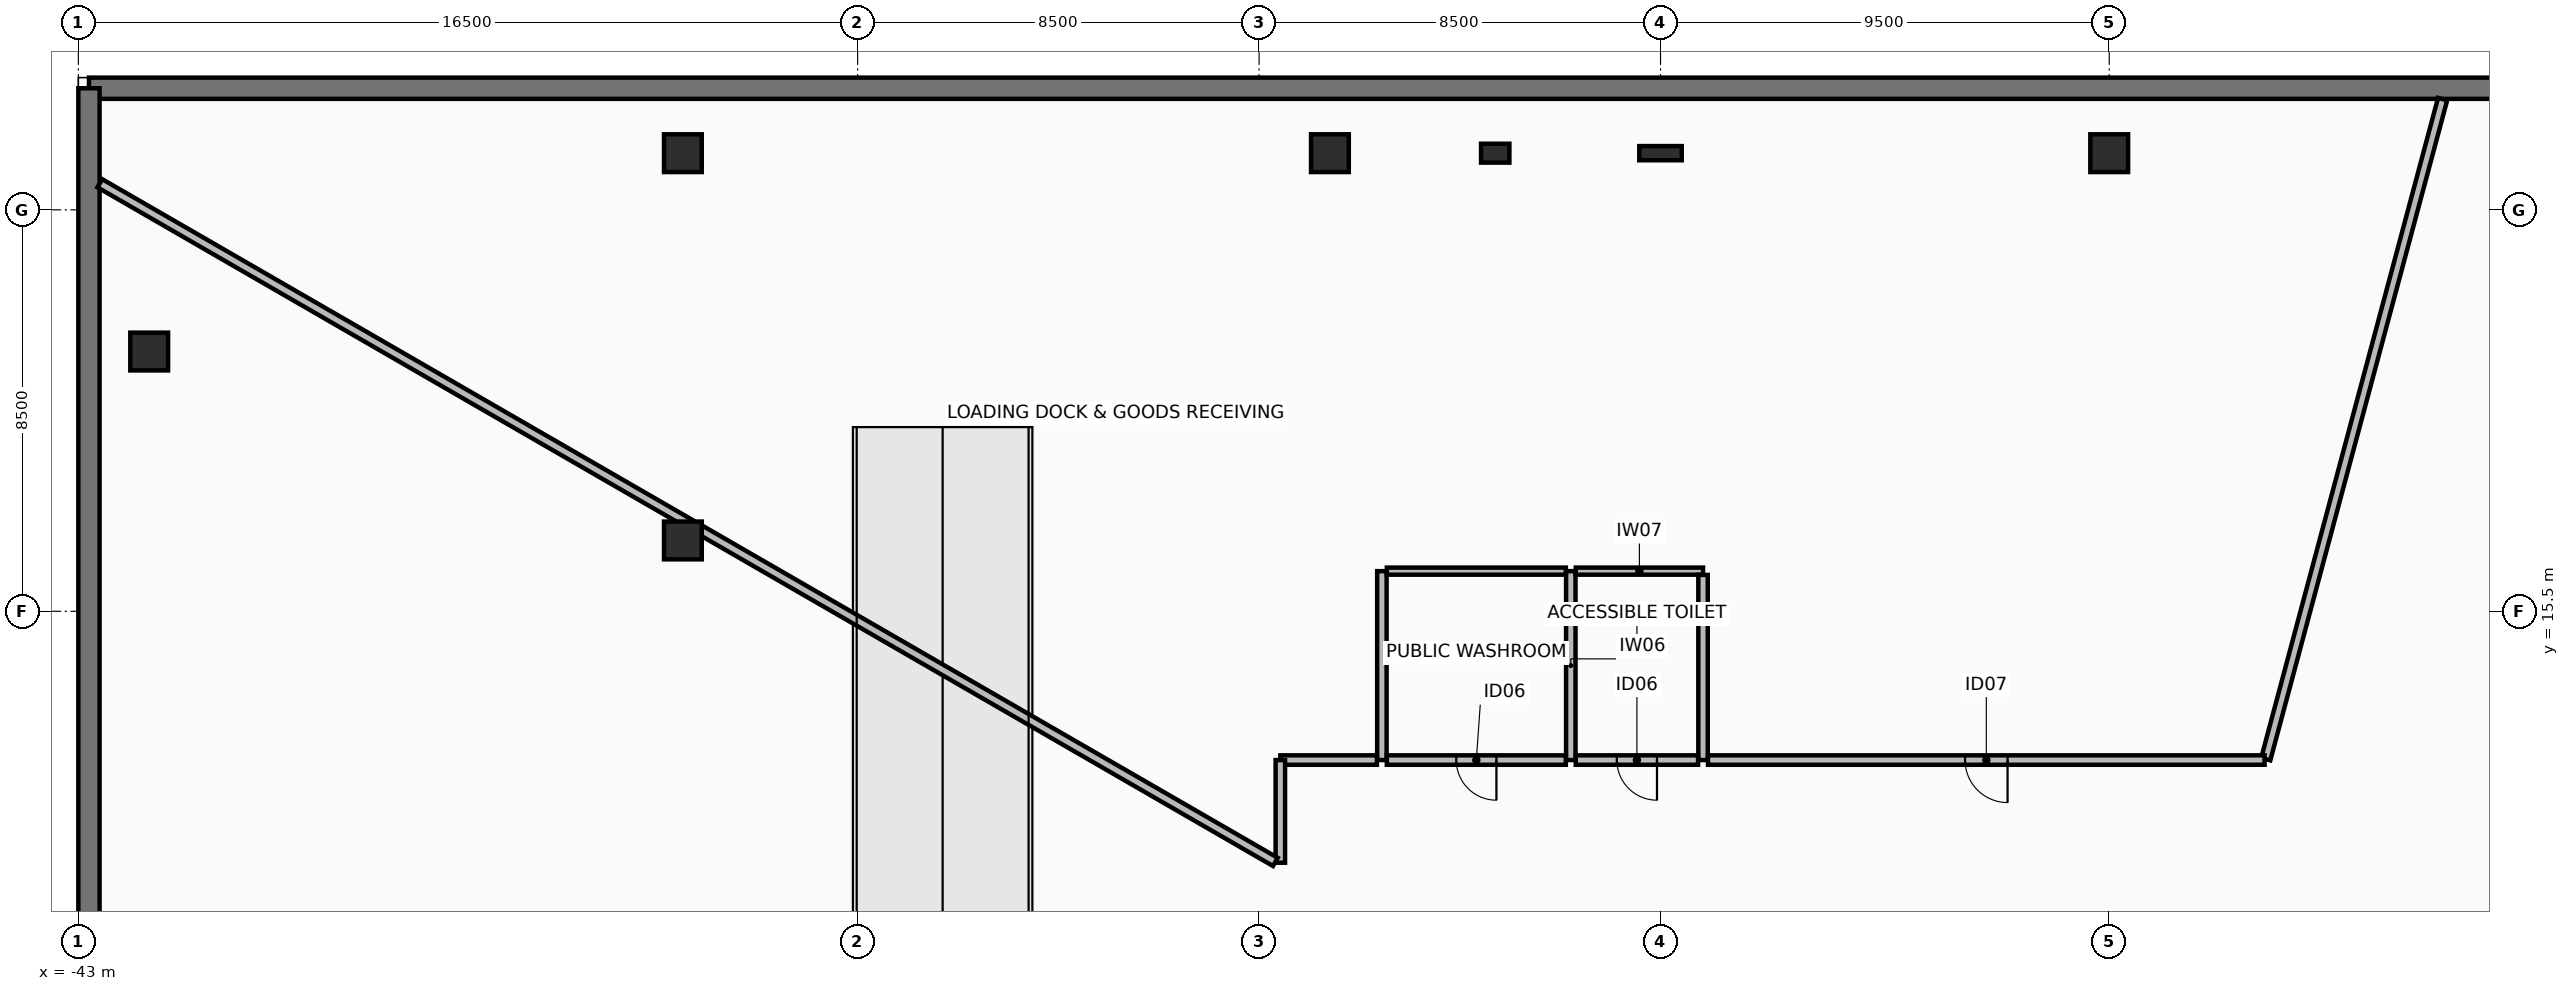
"""IFC4 building model, lengths in metres.
Left out: names, types, materials, properties, quantities, classifications, styles, units other than length and angle.
Written with IfcOpenShell. Run it as: python <this file> out.ifc"""

import sys

from ifc_helpers import new_model, si_unit, direction, frame, frame_2d, origin, origin_2d, place, context, subcontext, project, spatial, rectangle, hollow_rectangle, i_section, extrude, element, fill, save


model = new_model("IFC4")
c1 = context("Model", 3, precision=1e-05, world=origin(), true_north=direction((0.0, 1.0)))
c2 = subcontext(c1, "Body", "Model", "MODEL_VIEW")
j1 = project(units=[si_unit("LENGTHUNIT", "METRE"), si_unit("PLANEANGLEUNIT", "RADIAN")], contexts=[c1])
p1 = place(None, origin())
s1 = spatial("IfcSite", under=j1, at=p1, CompositionType="ELEMENT")
p2 = place(p1, origin())
s2 = spatial("IfcBuilding", under=s1, at=p2, CompositionType="ELEMENT")
p3 = place(p2, frame((0.0, 0.0, -4.5)))
s3 = spatial("IfcBuildingStorey", under=s2, at=p3, CompositionType="ELEMENT", Elevation=-4.5)
p4 = place(p3, frame((-13.0, 25.2, 0.0), z_axis=(0.0, 0.0, 1.0), x_axis=(1.0, 0.0, 0.0)))
e1 = element("IfcColumn", 1, at=p4, inside=s3, PredefinedType="PILASTER", context=c2, shape_type="SweptSolid", body=[
    extrude(rectangle(XDim=0.6, YDim=0.4, at=origin_2d()), origin(), (0.0, 0.0, 1.0), 4.5),
])
for number, where, z_axis, x_axis in (
    (2, (-30.2, 25.2, 0.0), (0.0, 0.0, 1.0), (1.0, 0.0, 0.0)),
    (3, (-16.5, 25.2, 0.0), (0.0, 0.0, 1.0), (1.0, 0.0, 0.0)),
):
    element("IfcColumn", number, at=place(p3, frame(where, z_axis=z_axis, x_axis=x_axis)), inside=s3, PredefinedType="COLUMN", context=c2, shape_type="SweptSolid", body=[
        extrude(hollow_rectangle(XDim=0.8, YDim=0.8, WallThickness=0.045, at=origin_2d()), origin(), (0.0, 0.0, 1.0), 4.5),
    ])
p5 = place(p3, frame((-9.5, 25.2, 0.0), z_axis=(0.0, 0.0, 1.0), x_axis=(1.0, 0.0, 0.0)))
e4 = element("IfcColumn", 4, at=p5, inside=s3, PredefinedType="COLUMN", context=c2, shape_type="SweptSolid", body=[
    extrude(i_section(OverallWidth=0.3, OverallDepth=0.9, WebThickness=0.019, FlangeThickness=0.035, at=origin_2d()), origin(), (0.0, 0.0, 1.0), 4.5),
])
for number, where, z_axis, x_axis in (
    (5, (0.0, 25.2, 0.0), (0.0, 0.0, 1.0), (1.0, 0.0, 0.0)),
    (6, (-30.2, 17.0, 0.0), (0.0, 0.0, 1.0), (1.0, 0.0, 0.0)),
    (7, (-41.5, 21.0, 0.0), (0.0, 0.0, 1.0), (1.0, 0.0, 0.0)),
):
    element("IfcColumn", number, at=place(p3, frame(where, z_axis=z_axis, x_axis=x_axis)), inside=s3, PredefinedType="COLUMN", context=c2, shape_type="SweptSolid", body=[
        extrude(hollow_rectangle(XDim=0.8, YDim=0.8, WallThickness=0.045, at=origin_2d()), origin(), (0.0, 0.0, 1.0), 4.5),
    ])
p6 = place(p3, frame((42.775, 26.575, 0.0), z_axis=(0.0, 0.0, 1.0), x_axis=(-1.0, 0.0, 0.0)))
e8 = element("IfcWall", 8, at=p6, inside=s3, PredefinedType="STANDARD", context=c2, shape_type="SweptSolid", body=[
    extrude(rectangle(XDim=85.55, YDim=0.45, at=frame_2d((42.775, 0.0))), origin(), (0.0, 0.0, 1.0), 4.2),
])
p7 = place(p3, frame((-42.775, 26.575, 0.0), z_axis=(0.0, 0.0, 1.0), x_axis=(0.0, -1.0, 0.0)))
e9 = element("IfcWall", 9, at=p7, inside=s3, PredefinedType="STANDARD", context=c2, shape_type="SweptSolid", body=[
    extrude(rectangle(XDim=54.35, YDim=0.45, at=frame_2d((27.175, 0.0))), origin(), (0.0, 0.0, 1.0), 4.2),
])
p8 = place(p3, frame((-11.4, 12.35, 0.0), z_axis=(0.0, 0.0, 1.0), x_axis=(0.0, 1.0, 0.0)))
e10 = element("IfcWall", 10, at=p8, inside=s3, PredefinedType="PARTITIONING", context=c2, shape_type="SweptSolid", body=[
    extrude(rectangle(XDim=4.0, YDim=0.2, at=frame_2d((2.0, 0.0))), origin(), (0.0, 0.0, 1.0), 3.745),
])
p9 = place(p3, frame((-11.295, 16.35, 0.0), z_axis=(0.0, 0.0, 1.0), x_axis=(1.0, 0.0, 0.0)))
e11 = element("IfcWall", 11, at=p9, inside=s3, PredefinedType="PARTITIONING", context=c2, shape_type="SweptSolid", body=[
    extrude(rectangle(XDim=2.695, YDim=0.15, at=frame_2d((1.347, 0.0))), origin(), (0.0, 0.0, 1.0), 3.545),
])
p10 = place(p3, frame((-8.6, 16.27, 0.0), z_axis=(0.0, 0.0, 1.0), x_axis=(0.0, -1.0, 0.0)))
e12 = element("IfcWall", 12, at=p10, inside=s3, PredefinedType="PARTITIONING", context=c2, shape_type="SweptSolid", body=[
    extrude(rectangle(XDim=3.92, YDim=0.2, at=frame_2d((1.96, 0.0))), origin(), (0.0, 0.0, 1.0), 3.745),
])
p11 = place(p3, frame((-8.705, 12.35, 0.0), z_axis=(0.0, 0.0, 1.0), x_axis=(-1.0, 0.0, 0.0)))
e13 = element("IfcWall", 13, at=p11, inside=s3, PredefinedType="PARTITIONING", context=c2, shape_type="SweptSolid", body=[
    extrude(rectangle(XDim=2.59, YDim=0.2, at=frame_2d((1.295, 0.0))), origin(), (0.0, 0.0, 1.0), 3.545),
])
p12 = place(p11, frame((0.87, 0.0, 0.0)))
e14 = element("IfcOpeningElement", 14, at=p12, cuts=e13, PredefinedType="OPENING", context=c2, shape_type="SweptSolid", body=[
    extrude(rectangle(XDim=0.85, YDim=2.1, at=frame_2d((0.425, 1.05))), frame((0.0, 0.11, 0.0), z_axis=(0.0, -1.0, 0.0), x_axis=(1.0, 0.0, 0.0)), (0.0, 0.0, 1.0), 0.22),
])
p13 = place(p3, frame((-15.4, 12.35, 0.0), z_axis=(0.0, 0.0, 1.0), x_axis=(0.0, 1.0, 0.0)))
e15 = element("IfcWall", 15, at=p13, inside=s3, PredefinedType="PARTITIONING", context=c2, shape_type="SweptSolid", body=[
    extrude(rectangle(XDim=4.0, YDim=0.2, at=frame_2d((2.0, 0.0))), origin(), (0.0, 0.0, 1.0), 3.745),
])
p14 = place(p3, frame((-15.295, 16.35, 0.0), z_axis=(0.0, 0.0, 1.0), x_axis=(1.0, 0.0, 0.0)))
e16 = element("IfcWall", 16, at=p14, inside=s3, PredefinedType="PARTITIONING", context=c2, shape_type="SweptSolid", body=[
    extrude(rectangle(XDim=3.79, YDim=0.15, at=frame_2d((1.895, 0.0))), origin(), (0.0, 0.0, 1.0), 4.2),
])
p15 = place(p3, frame((-11.505, 12.35, 0.0), z_axis=(0.0, 0.0, 1.0), x_axis=(-1.0, 0.0, 0.0)))
e17 = element("IfcWall", 17, at=p15, inside=s3, PredefinedType="PARTITIONING", context=c2, shape_type="SweptSolid", body=[
    extrude(rectangle(XDim=3.79, YDim=0.2, at=frame_2d((1.895, 0.0))), origin(), (0.0, 0.0, 1.0), 4.2),
])
p16 = place(p15, frame((1.47, 0.0, 0.0)))
e18 = element("IfcOpeningElement", 18, at=p16, cuts=e17, PredefinedType="OPENING", context=c2, shape_type="SweptSolid", body=[
    extrude(rectangle(XDim=0.85, YDim=2.1, at=frame_2d((0.425, 1.05))), frame((0.0, 0.11, 0.0), z_axis=(0.0, -1.0, 0.0), x_axis=(1.0, 0.0, 0.0)), (0.0, 0.0, 1.0), 0.22),
])
p17 = place(p3, frame((7.059, 26.345, 0.0), z_axis=(0.0, 0.0, 1.0), x_axis=(-0.258810302239, -0.96592816889, 0.0)))
e19 = element("IfcWall", 19, at=p17, inside=s3, PredefinedType="PARTITIONING", context=c2, shape_type="SweptSolid", body=[
    extrude(rectangle(XDim=14.469, YDim=0.2, at=frame_2d((7.235, 0.0))), origin(), (0.0, 0.0, 1.0), 3.295),
])
p18 = place(p3, frame((3.29, 12.35, 0.0), z_axis=(0.0, 0.0, 1.0), x_axis=(-1.0, 0.0, 0.0)))
e20 = element("IfcWall", 20, at=p18, inside=s3, PredefinedType="PARTITIONING", context=c2, shape_type="SweptSolid", body=[
    extrude(rectangle(XDim=11.785, YDim=0.2, at=frame_2d((5.893, 0.0))), origin(), (0.0, 0.0, 1.0), 3.545),
])
p19 = place(p18, frame((5.442, 0.0, 0.0)))
e21 = element("IfcOpeningElement", 21, at=p19, cuts=e20, PredefinedType="OPENING", context=c2, shape_type="SweptSolid", body=[
    extrude(rectangle(XDim=0.9, YDim=2.1, at=frame_2d((0.45, 1.05))), frame((0.0, 0.11, 0.0), z_axis=(0.0, -1.0, 0.0), x_axis=(1.0, 0.0, 0.0)), (0.0, 0.0, 1.0), 0.22),
])
p20 = place(p3, frame((-15.505, 12.35, 0.0), z_axis=(0.0, 0.0, 1.0), x_axis=(-1.0, 0.0, 0.0)))
e22 = element("IfcWall", 22, at=p20, inside=s3, PredefinedType="PARTITIONING", context=c2, shape_type="SweptSolid", body=[
    extrude(rectangle(XDim=2.044, YDim=0.2, at=frame_2d((1.022, 0.0))), origin(), (0.0, 0.0, 1.0), 3.545),
])
p21 = place(p3, frame((-17.55, 12.349, 0.0), z_axis=(0.0, 0.0, 1.0), x_axis=(0.0, -1.0, 0.0)))
e23 = element("IfcWall", 23, at=p21, inside=s3, PredefinedType="PARTITIONING", context=c2, shape_type="SweptSolid", body=[
    extrude(rectangle(XDim=2.174, YDim=0.2, at=frame_2d((1.087, 0.0))), origin(), (0.0, 0.0, 1.0), 4.2),
])
p22 = place(p3, frame((-17.655, 10.193, 0.0), z_axis=(0.0, 0.0, 1.0), x_axis=(-0.866026443251, 0.499998199587, 0.0)))
e24 = element("IfcWall", 24, at=p22, inside=s3, PredefinedType="PARTITIONING", context=c2, shape_type="SweptSolid", body=[
    extrude(rectangle(XDim=28.74, YDim=0.2, at=frame_2d((14.37, 0.0))), origin(), (0.0, 0.0, 1.0), 3.395),
])
p23 = place(p12, origin())
e25 = element("IfcDoor", 25, at=p23, inside=s3, OperationType="SINGLE_SWING_RIGHT", PredefinedType="DOOR", context=c2, shape_type="SweptSolid", body=[
    extrude(rectangle(XDim=0.85, YDim=2.1, at=frame_2d((0.425, 1.05))), frame((0.0, 0.025, 0.0), z_axis=(0.0, -1.0, 0.0), x_axis=(1.0, 0.0, 0.0)), (0.0, 0.0, 1.0), 0.05),
])
fill(e14, e25)
p24 = place(p16, origin())
e26 = element("IfcDoor", 26, at=p24, inside=s3, OperationType="SINGLE_SWING_RIGHT", PredefinedType="DOOR", context=c2, shape_type="SweptSolid", body=[
    extrude(rectangle(XDim=0.85, YDim=2.1, at=frame_2d((0.425, 1.05))), frame((0.0, 0.025, 0.0), z_axis=(0.0, -1.0, 0.0), x_axis=(1.0, 0.0, 0.0)), (0.0, 0.0, 1.0), 0.05),
])
fill(e18, e26)
p25 = place(p19, origin())
e27 = element("IfcDoor", 27, at=p25, inside=s3, OperationType="SINGLE_SWING_LEFT", PredefinedType="DOOR", context=c2, shape_type="SweptSolid", body=[
    extrude(rectangle(XDim=0.9, YDim=2.1, at=frame_2d((0.45, 1.05))), frame((0.0, 0.025, 0.0), z_axis=(0.0, -1.0, 0.0), x_axis=(1.0, 0.0, 0.0)), (0.0, 0.0, 1.0), 0.05),
])
fill(e21, e27)
save(model, sys.argv[1])
